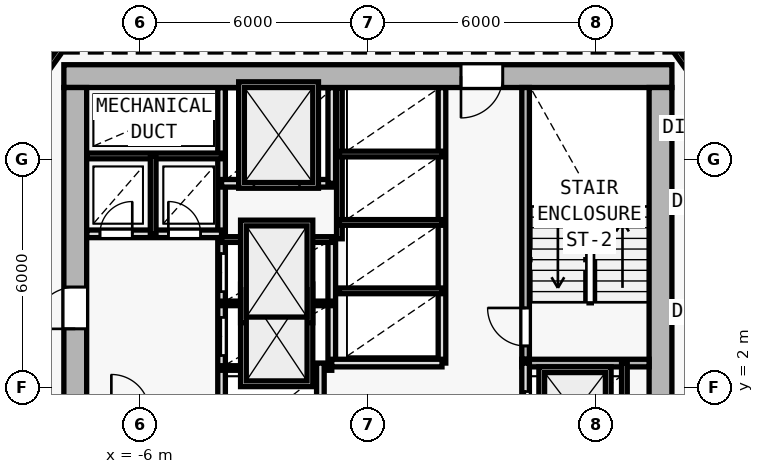
"""IFC4 building model, lengths in metres.
Left out: names, types, materials, properties, quantities, classifications, styles, units other than length and angle.
Written with IfcOpenShell. Run it as: python <this file> out.ifc"""

import sys

from ifc_helpers import new_model, si_unit, direction, frame, frame_2d, origin, origin_2d, place, context, subcontext, project, spatial, rectangle, i_section, extrude, element, fill, save


model = new_model("IFC4")
c1 = context("Model", 3, precision=1e-05, world=origin(), true_north=direction((0.0, 1.0)))
c2 = subcontext(c1, "Body", "Model", "MODEL_VIEW")
j1 = project(units=[si_unit("LENGTHUNIT", "METRE"), si_unit("PLANEANGLEUNIT", "RADIAN")], contexts=[c1])
p1 = place(None, origin())
s1 = spatial("IfcSite", under=j1, at=p1, CompositionType="ELEMENT")
p2 = place(p1, origin())
s2 = spatial("IfcBuilding", under=s1, at=p2, CompositionType="ELEMENT")
p3 = place(p2, frame((0.0, 0.0, 51.6)))
s3 = spatial("IfcBuildingStorey", under=s2, at=p3, CompositionType="ELEMENT", Elevation=51.6)
for number, where, z_axis, x_axis in (
    (1, (7.7, 10.2, 0.0), (0.0, 0.0, 1.0), (1.0, 0.0, 0.0)),
    (2, (-7.7, 10.2, 0.0), (0.0, 0.0, 1.0), (1.0, 0.0, 0.0)),
    (3, (-7.7, 2.0, 0.0), (0.0, 0.0, 1.0), (1.0, 0.0, 0.0)),
):
    element("IfcColumn", number, at=place(p3, frame(where, z_axis=z_axis, x_axis=x_axis)), inside=s3, PredefinedType="COLUMN", context=c2, shape_type="SweptSolid", body=[
        extrude(i_section(OverallWidth=0.416, OverallDepth=0.446, WebThickness=0.025, FlangeThickness=0.04, FilletRadius=0.015, at=origin_2d()), origin(), (0.0, 0.0, 1.0), 3.6),
    ])
p4 = place(p3, frame((8.0, 10.2, 0.0), z_axis=(0.0, 0.0, 1.0), x_axis=(-1.0, 0.0, 0.0)))
e4 = element("IfcWall", 4, at=p4, inside=s3, PredefinedType="SHEAR", context=c2, shape_type="SweptSolid", body=[
    extrude(rectangle(XDim=16.0, YDim=0.6, at=frame_2d((8.0, 0.0))), origin(), (0.0, 0.0, 1.0), 3.35),
])
p5 = place(p4, frame((4.45, 0.0, 0.0)))
e5 = element("IfcOpeningElement", 5, at=p5, cuts=e4, PredefinedType="OPENING", context=c2, shape_type="SweptSolid", body=[
    extrude(rectangle(XDim=1.1, YDim=2.15, at=frame_2d((0.55, 1.075))), frame((0.0, 0.31, 0.0), z_axis=(0.0, -1.0, 0.0), x_axis=(1.0, 0.0, 0.0)), (0.0, 0.0, 1.0), 0.62),
])
p6 = place(p3, frame((-7.7, -9.1, 0.0), z_axis=(0.0, 0.0, 1.0), x_axis=(0.0, 1.0, 0.0)))
e6 = element("IfcWall", 6, at=p6, inside=s3, PredefinedType="SHEAR", context=c2, shape_type="SweptSolid", body=[
    extrude(rectangle(XDim=19.0, YDim=0.6, at=frame_2d((9.5, 0.0))), origin(), (0.0, 0.0, 1.0), 3.35),
])
p7 = place(p6, frame((12.65, 0.0, 0.0)))
e7 = element("IfcOpeningElement", 7, at=p7, cuts=e6, PredefinedType="OPENING", context=c2, shape_type="SweptSolid", body=[
    extrude(rectangle(XDim=1.1, YDim=2.15, at=frame_2d((0.55, 1.075))), frame((0.0, 0.31, 0.0), z_axis=(0.0, -1.0, 0.0), x_axis=(1.0, 0.0, 0.0)), (0.0, 0.0, 1.0), 0.62),
])
p8 = place(p3, frame((7.7, 9.9, 0.0), z_axis=(0.0, 0.0, 1.0), x_axis=(0.0, -1.0, 0.0)))
e8 = element("IfcWall", 8, at=p8, inside=s3, PredefinedType="SHEAR", context=c2, shape_type="SweptSolid", body=[
    extrude(rectangle(XDim=19.0, YDim=0.6, at=frame_2d((9.5, 0.0))), origin(), (0.0, 0.0, 1.0), 3.35),
])
p9 = place(p3, frame((-3.85, 1.35, 0.0), z_axis=(0.0, 0.0, 1.0), x_axis=(0.0, 1.0, 0.0)))
e9 = element("IfcWall", 9, at=p9, inside=s3, PredefinedType="SOLIDWALL", context=c2, shape_type="SweptSolid", body=[
    extrude(rectangle(XDim=8.545, YDim=0.2, at=frame_2d((4.272, 0.0))), origin(), (0.0, 0.0, 1.0), 3.35),
])
p10 = place(p9, frame((1.5, 0.0, 0.0)))
e10 = element("IfcOpeningElement", 10, at=p10, cuts=e9, PredefinedType="OPENING", context=c2, shape_type="SweptSolid", body=[
    extrude(rectangle(XDim=1.0, YDim=2.15, at=frame_2d((0.5, 1.075))), frame((0.0, 0.11, 0.0), z_axis=(0.0, -1.0, 0.0), x_axis=(1.0, 0.0, 0.0)), (0.0, 0.0, 1.0), 0.22),
])
p11 = place(p9, frame((3.18, 0.0, 0.0)))
e11 = element("IfcOpeningElement", 11, at=p11, cuts=e9, PredefinedType="OPENING", context=c2, shape_type="SweptSolid", body=[
    extrude(rectangle(XDim=1.0, YDim=2.15, at=frame_2d((0.5, 1.075))), frame((0.0, 0.11, 0.0), z_axis=(0.0, -1.0, 0.0), x_axis=(1.0, 0.0, 0.0)), (0.0, 0.0, 1.0), 0.22),
])
p12 = place(p3, frame((-7.395, 6.05, 0.0), z_axis=(0.0, 0.0, 1.0), x_axis=(1.0, 0.0, 0.0)))
e12 = element("IfcWall", 12, at=p12, inside=s3, PredefinedType="SOLIDWALL", context=c2, shape_type="SweptSolid", body=[
    extrude(rectangle(XDim=3.545, YDim=0.2, at=frame_2d((1.772, 0.0))), origin(), (0.0, 0.0, 1.0), 3.35),
])
p13 = place(p12, frame((0.345, 0.0, 0.0)))
e13 = element("IfcOpeningElement", 13, at=p13, cuts=e12, PredefinedType="OPENING", context=c2, shape_type="SweptSolid", body=[
    extrude(rectangle(XDim=0.85, YDim=2.1, at=frame_2d((0.425, 1.05))), frame((0.0, 0.11, 0.0), z_axis=(0.0, -1.0, 0.0), x_axis=(1.0, 0.0, 0.0)), (0.0, 0.0, 1.0), 0.22),
])
p14 = place(p12, frame((2.145, 0.0, 0.0)))
e14 = element("IfcOpeningElement", 14, at=p14, cuts=e12, PredefinedType="OPENING", context=c2, shape_type="SweptSolid", body=[
    extrude(rectangle(XDim=0.85, YDim=2.1, at=frame_2d((0.425, 1.05))), frame((0.0, 0.11, 0.0), z_axis=(0.0, -1.0, 0.0), x_axis=(1.0, 0.0, 0.0)), (0.0, 0.0, 1.0), 0.22),
])
p15 = place(p3, frame((-7.395, 8.1, 0.0), z_axis=(0.0, 0.0, 1.0), x_axis=(1.0, 0.0, 0.0)))
e15 = element("IfcWall", 15, at=p15, inside=s3, PredefinedType="PARTITIONING", context=c2, shape_type="SweptSolid", body=[
    extrude(rectangle(XDim=3.545, YDim=0.15, at=frame_2d((1.772, 0.0))), origin(), (0.0, 0.0, 1.0), 3.35),
])
p16 = place(p3, frame((-5.65, 6.05, 0.0), z_axis=(0.0, 0.0, 1.0), x_axis=(0.0, 1.0, 0.0)))
e16 = element("IfcWall", 16, at=p16, inside=s3, PredefinedType="PARTITIONING", context=c2, shape_type="SweptSolid", body=[
    extrude(rectangle(XDim=2.05, YDim=0.15, at=frame_2d((1.025, 0.0))), origin(), (0.0, 0.0, 1.0), 3.35),
])
p17 = place(p3, frame((4.15, 2.75, 0.0), z_axis=(0.0, 0.0, 1.0), x_axis=(0.0, 1.0, 0.0)))
e17 = element("IfcWall", 17, at=p17, inside=s3, PredefinedType="SOLIDWALL", context=c2, shape_type="SweptSolid", body=[
    extrude(rectangle(XDim=7.15, YDim=0.2, at=frame_2d((3.575, 0.0))), origin(), (0.0, 0.0, 1.0), 3.35),
])
p18 = place(p17, frame((0.35, 0.0, 0.0)))
e18 = element("IfcOpeningElement", 18, at=p18, cuts=e17, PredefinedType="OPENING", context=c2, shape_type="SweptSolid", body=[
    extrude(rectangle(XDim=1.0, YDim=2.15, at=frame_2d((0.5, 1.075))), frame((0.0, 0.11, 0.0), z_axis=(0.0, -1.0, 0.0), x_axis=(1.0, 0.0, 0.0)), (0.0, 0.0, 1.0), 0.22),
])
p19 = place(p3, frame((4.05, 2.65, 0.0), z_axis=(0.0, 0.0, 1.0), x_axis=(1.0, 0.0, 0.0)))
e19 = element("IfcWall", 19, at=p19, inside=s3, PredefinedType="SOLIDWALL", context=c2, shape_type="SweptSolid", body=[
    extrude(rectangle(XDim=3.35, YDim=0.2, at=frame_2d((1.675, 0.0))), origin(), (0.0, 0.0, 1.0), 3.35),
])
p20 = place(p3, frame((-0.95, 2.65, 0.0), z_axis=(0.0, 0.0, 1.0), x_axis=(0.0, 1.0, 0.0)))
e20 = element("IfcWall", 20, at=p20, inside=s3, PredefinedType="SOLIDWALL", context=c2, shape_type="SweptSolid", body=[
    extrude(rectangle(XDim=3.27, YDim=0.2, at=frame_2d((1.635, 0.0))), origin(), (0.0, 0.0, 1.0), 3.35),
])
for number, where, z_axis, x_axis in (
    (21, (-3.85, 2.52, 0.0), (0.0, 0.0, 1.0), (1.0, 0.0, 0.0)),
    (22, (-3.85, 4.22, 0.0), (0.0, 0.0, 1.0), (1.0, 0.0, 0.0)),
):
    element("IfcWall", number, at=place(p3, frame(where, z_axis=z_axis, x_axis=x_axis)), inside=s3, PredefinedType="PARTITIONING", context=c2, shape_type="SweptSolid", body=[
        extrude(rectangle(XDim=2.9, YDim=0.12, at=frame_2d((1.45, 0.0))), origin(), (0.0, 0.0, 1.0), 3.35),
    ])
p21 = place(p3, frame((-3.85, 5.9, 0.0), z_axis=(0.0, 0.0, 1.0), x_axis=(1.0, 0.0, 0.0)))
e23 = element("IfcWall", 23, at=p21, inside=s3, PredefinedType="PARTITIONING", context=c2, shape_type="SweptSolid", body=[
    extrude(rectangle(XDim=2.9, YDim=0.15, at=frame_2d((1.45, 0.0))), origin(), (0.0, 0.0, 1.0), 3.35),
])
p22 = place(p3, frame((-3.85, 7.38, 0.0), z_axis=(0.0, 0.0, 1.0), x_axis=(1.0, 0.0, 0.0)))
e24 = element("IfcWall", 24, at=p22, inside=s3, PredefinedType="SOLIDWALL", context=c2, shape_type="SweptSolid", body=[
    extrude(rectangle(XDim=2.9, YDim=0.2, at=frame_2d((1.45, 0.0))), origin(), (0.0, 0.0, 1.0), 3.35),
])
p23 = place(p22, frame((0.85, 0.0, 0.0)))
e25 = element("IfcOpeningElement", 25, at=p23, cuts=e24, PredefinedType="OPENING", context=c2, shape_type="SweptSolid", body=[
    extrude(rectangle(XDim=1.2, YDim=2.2, at=frame_2d((0.6, 1.1))), frame((0.0, 0.11, 0.0), z_axis=(0.0, -1.0, 0.0), x_axis=(1.0, 0.0, 0.0)), (0.0, 0.0, 1.0), 0.22),
])
p24 = place(p3, frame((-0.95, 7.38, 0.0), z_axis=(0.0, 0.0, 1.0), x_axis=(0.0, 1.0, 0.0)))
e26 = element("IfcWall", 26, at=p24, inside=s3, PredefinedType="SOLIDWALL", context=c2, shape_type="SweptSolid", body=[
    extrude(rectangle(XDim=2.515, YDim=0.2, at=frame_2d((1.258, 0.0))), origin(), (0.0, 0.0, 1.0), 3.35),
])
p25 = place(p3, frame((4.15, -6.05, 0.0), z_axis=(0.0, 0.0, 1.0), x_axis=(0.0, 1.0, 0.0)))
e27 = element("IfcWall", 27, at=p25, inside=s3, PredefinedType="SOLIDWALL", context=c2, shape_type="SweptSolid", body=[
    extrude(rectangle(XDim=8.7, YDim=0.2, at=frame_2d((4.35, 0.0))), origin(), (0.0, 0.0, 1.0), 3.35),
])
p26 = place(p25, frame((0.55, 0.0, 0.0)))
e28 = element("IfcOpeningElement", 28, at=p26, cuts=e27, PredefinedType="OPENING", context=c2, shape_type="SweptSolid", body=[
    extrude(rectangle(XDim=1.1, YDim=2.15, at=frame_2d((0.55, 1.075))), frame((0.0, 0.11, 0.0), z_axis=(0.0, -1.0, 0.0), x_axis=(1.0, 0.0, 0.0)), (0.0, 0.0, 1.0), 0.22),
])
p27 = place(p25, frame((2.65, 0.0, 0.0)))
e29 = element("IfcOpeningElement", 29, at=p27, cuts=e27, PredefinedType="OPENING", context=c2, shape_type="SweptSolid", body=[
    extrude(rectangle(XDim=1.1, YDim=2.15, at=frame_2d((0.55, 1.075))), frame((0.0, 0.11, 0.0), z_axis=(0.0, -1.0, 0.0), x_axis=(1.0, 0.0, 0.0)), (0.0, 0.0, 1.0), 0.22),
])
p28 = place(p25, frame((4.75, 0.0, 0.0)))
e30 = element("IfcOpeningElement", 30, at=p28, cuts=e27, PredefinedType="OPENING", context=c2, shape_type="SweptSolid", body=[
    extrude(rectangle(XDim=1.1, YDim=2.15, at=frame_2d((0.55, 1.075))), frame((0.0, 0.11, 0.0), z_axis=(0.0, -1.0, 0.0), x_axis=(1.0, 0.0, 0.0)), (0.0, 0.0, 1.0), 0.22),
])
p29 = place(p25, frame((6.85, 0.0, 0.0)))
e31 = element("IfcOpeningElement", 31, at=p29, cuts=e27, PredefinedType="OPENING", context=c2, shape_type="SweptSolid", body=[
    extrude(rectangle(XDim=1.1, YDim=2.15, at=frame_2d((0.55, 1.075))), frame((0.0, 0.11, 0.0), z_axis=(0.0, -1.0, 0.0), x_axis=(1.0, 0.0, 0.0)), (0.0, 0.0, 1.0), 0.22),
])
p30 = place(p3, frame((6.75, -6.05, 0.0), z_axis=(0.0, 0.0, 1.0), x_axis=(0.0, 1.0, 0.0)))
e32 = element("IfcWall", 32, at=p30, inside=s3, PredefinedType="PARTITIONING", context=c2, shape_type="SweptSolid", body=[
    extrude(rectangle(XDim=8.7, YDim=0.15, at=frame_2d((4.35, 0.0))), origin(), (0.0, 0.0, 1.0), 3.35),
])
p31 = place(p3, frame((-1.25, -6.05, 0.0), z_axis=(0.0, 0.0, 1.0), x_axis=(0.0, 1.0, 0.0)))
e33 = element("IfcWall", 33, at=p31, inside=s3, PredefinedType="SOLIDWALL", context=c2, shape_type="SweptSolid", body=[
    extrude(rectangle(XDim=8.7, YDim=0.2, at=frame_2d((4.35, 0.0))), origin(), (0.0, 0.0, 1.0), 3.35),
])
p32 = place(p3, frame((1.95, 2.65, 0.0), z_axis=(0.0, 0.0, 1.0), x_axis=(0.0, 1.0, 0.0)))
e34 = element("IfcWall", 34, at=p32, inside=s3, PredefinedType="SOLIDWALL", context=c2, shape_type="SweptSolid", body=[
    extrude(rectangle(XDim=7.245, YDim=0.2, at=frame_2d((3.623, 0.0))), origin(), (0.0, 0.0, 1.0), 3.35),
])
p33 = place(p3, frame((-0.95, 2.65, 0.0), z_axis=(0.0, 0.0, 1.0), x_axis=(1.0, 0.0, 0.0)))
e35 = element("IfcWall", 35, at=p33, inside=s3, PredefinedType="SOLIDWALL", context=c2, shape_type="SweptSolid", body=[
    extrude(rectangle(XDim=2.9, YDim=0.2, at=frame_2d((1.45, 0.0))), origin(), (0.0, 0.0, 1.0), 3.35),
])
p34 = place(p3, frame((-0.75, 5.92, 0.0), z_axis=(0.0, 0.0, 1.0), x_axis=(0.0, 1.0, 0.0)))
e36 = element("IfcWall", 36, at=p34, inside=s3, PredefinedType="PARTITIONING", context=c2, shape_type="SweptSolid", body=[
    extrude(rectangle(XDim=3.975, YDim=0.15, at=frame_2d((1.988, 0.0))), origin(), (0.0, 0.0, 1.0), 3.35),
])
for number, where, z_axis, x_axis in (
    (37, (-0.75, 4.55, 0.0), (0.0, 0.0, 1.0), (1.0, 0.0, 0.0)),
    (38, (-0.75, 6.35, 0.0), (0.0, 0.0, 1.0), (1.0, 0.0, 0.0)),
    (39, (-0.75, 8.15, 0.0), (0.0, 0.0, 1.0), (1.0, 0.0, 0.0)),
):
    element("IfcWall", number, at=place(p3, frame(where, z_axis=z_axis, x_axis=x_axis)), inside=s3, PredefinedType="PARTITIONING", context=c2, shape_type="SweptSolid", body=[
        extrude(rectangle(XDim=2.7, YDim=0.15, at=frame_2d((1.35, 0.0))), origin(), (0.0, 0.0, 1.0), 3.35),
    ])
p35 = place(p3, frame((-9.86, 8.426, 0.0), z_axis=(0.0, 0.0, 1.0), x_axis=(0.582449511476, 0.812866881218, 0.0)))
e40 = element("IfcWall", 40, at=p35, inside=s3, PredefinedType="PARTITIONING", context=c2, shape_type="SweptSolid", body=[
    extrude(rectangle(XDim=4.84, YDim=0.15, at=frame_2d((2.42, 0.0))), origin(), (0.0, 0.0, 1.0), 2.725),
])
p36 = place(p3, frame((7.041, 12.36, 0.0), z_axis=(0.0, 0.0, 1.0), x_axis=(0.582449511476, -0.812866881218, 0.0)))
e41 = element("IfcWall", 41, at=p36, inside=s3, PredefinedType="PARTITIONING", context=c2, shape_type="SweptSolid", body=[
    extrude(rectangle(XDim=4.84, YDim=0.15, at=frame_2d((2.42, 0.0))), origin(), (0.0, 0.0, 1.0), 2.725),
])
p37 = place(p36, frame((2.801, 0.0, 0.0)))
e42 = element("IfcOpeningElement", 42, at=p37, cuts=e41, PredefinedType="OPENING", context=c2, shape_type="SweptSolid", body=[
    extrude(rectangle(XDim=0.85, YDim=2.1, at=frame_2d((0.425, 1.05))), frame((0.0, 0.085, 0.0), z_axis=(0.0, -1.0, 0.0), x_axis=(1.0, 0.0, 0.0)), (0.0, 0.0, 1.0), 0.17),
])
p38 = place(p7, origin())
e43 = element("IfcDoor", 43, at=p38, inside=s3, OperationType="SINGLE_SWING_LEFT", PredefinedType="DOOR", context=c2, shape_type="SweptSolid", body=[
    extrude(rectangle(XDim=1.1, YDim=2.15, at=frame_2d((0.55, 1.075))), frame((0.0, 0.025, 0.0), z_axis=(0.0, -1.0, 0.0), x_axis=(1.0, 0.0, 0.0)), (0.0, 0.0, 1.0), 0.05),
])
fill(e7, e43)
p39 = place(p5, origin())
e44 = element("IfcDoor", 44, at=p39, inside=s3, OperationType="SINGLE_SWING_RIGHT", PredefinedType="DOOR", context=c2, shape_type="SweptSolid", body=[
    extrude(rectangle(XDim=1.1, YDim=2.15, at=frame_2d((0.55, 1.075))), frame((0.0, 0.025, 0.0), z_axis=(0.0, -1.0, 0.0), x_axis=(1.0, 0.0, 0.0)), (0.0, 0.0, 1.0), 0.05),
])
fill(e5, e44)
p40 = place(p13, origin())
e45 = element("IfcDoor", 45, at=p40, inside=s3, OperationType="SINGLE_SWING_RIGHT", PredefinedType="DOOR", context=c2, shape_type="SweptSolid", body=[
    extrude(rectangle(XDim=0.85, YDim=2.1, at=frame_2d((0.425, 1.05))), frame((0.0, 0.025, 0.0), z_axis=(0.0, -1.0, 0.0), x_axis=(1.0, 0.0, 0.0)), (0.0, 0.0, 1.0), 0.05),
])
fill(e13, e45)
p41 = place(p14, origin())
e46 = element("IfcDoor", 46, at=p41, inside=s3, OperationType="SINGLE_SWING_LEFT", PredefinedType="DOOR", context=c2, shape_type="SweptSolid", body=[
    extrude(rectangle(XDim=0.85, YDim=2.1, at=frame_2d((0.425, 1.05))), frame((0.0, 0.025, 0.0), z_axis=(0.0, -1.0, 0.0), x_axis=(1.0, 0.0, 0.0)), (0.0, 0.0, 1.0), 0.05),
])
fill(e14, e46)
p42 = place(p18, origin())
e47 = element("IfcDoor", 47, at=p42, inside=s3, OperationType="SINGLE_SWING_RIGHT", PredefinedType="DOOR", context=c2, shape_type="SweptSolid", body=[
    extrude(rectangle(XDim=1.0, YDim=2.15, at=frame_2d((0.5, 1.075))), frame((0.0, 0.025, 0.0), z_axis=(0.0, -1.0, 0.0), x_axis=(1.0, 0.0, 0.0)), (0.0, 0.0, 1.0), 0.05),
])
fill(e18, e47)
p43 = place(p23, origin())
e48 = element("IfcDoor", 48, at=p43, inside=s3, OperationType="DOUBLE_DOOR_SLIDING", PredefinedType="DOOR", context=c2, shape_type="SweptSolid", body=[
    extrude(rectangle(XDim=1.2, YDim=2.2, at=frame_2d((0.6, 1.1))), frame((0.0, 0.025, 0.0), z_axis=(0.0, -1.0, 0.0), x_axis=(1.0, 0.0, 0.0)), (0.0, 0.0, 1.0), 0.05),
])
fill(e25, e48)
p44 = place(p29, origin())
e49 = element("IfcDoor", 49, at=p44, inside=s3, OperationType="DOUBLE_DOOR_SLIDING", PredefinedType="DOOR", context=c2, shape_type="SweptSolid", body=[
    extrude(rectangle(XDim=1.1, YDim=2.15, at=frame_2d((0.55, 1.075))), frame((0.0, 0.025, 0.0), z_axis=(0.0, -1.0, 0.0), x_axis=(1.0, 0.0, 0.0)), (0.0, 0.0, 1.0), 0.05),
])
fill(e31, e49)
p45 = place(p10, origin())
e50 = element("IfcDoor", 50, at=p45, inside=s3, OperationType="DOUBLE_DOOR_SLIDING", PredefinedType="DOOR", context=c2, shape_type="SweptSolid", body=[
    extrude(rectangle(XDim=1.0, YDim=2.15, at=frame_2d((0.5, 1.075))), frame((0.0, 0.025, 0.0), z_axis=(0.0, -1.0, 0.0), x_axis=(1.0, 0.0, 0.0)), (0.0, 0.0, 1.0), 0.05),
])
fill(e10, e50)
p46 = place(p11, origin())
e51 = element("IfcDoor", 51, at=p46, inside=s3, OperationType="DOUBLE_DOOR_SLIDING", PredefinedType="DOOR", context=c2, shape_type="SweptSolid", body=[
    extrude(rectangle(XDim=1.0, YDim=2.15, at=frame_2d((0.5, 1.075))), frame((0.0, 0.025, 0.0), z_axis=(0.0, -1.0, 0.0), x_axis=(1.0, 0.0, 0.0)), (0.0, 0.0, 1.0), 0.05),
])
fill(e11, e51)
save(model, sys.argv[1])
